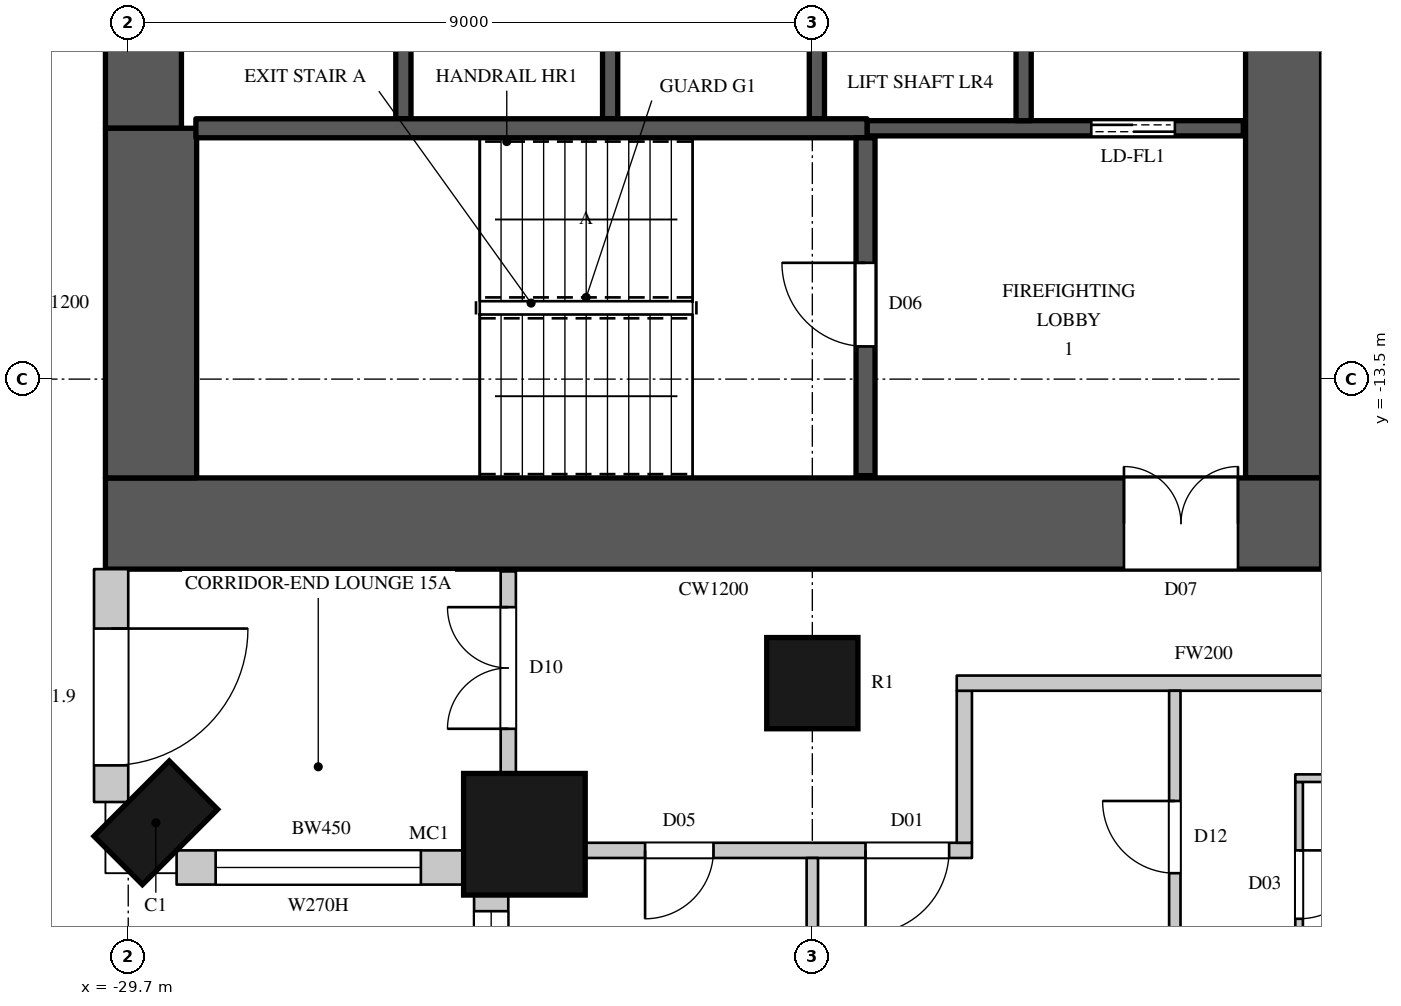
"""IFC4 building model, lengths in metres.
Left out: names, types, materials, properties, quantities, classifications, styles, units other than length and angle.
Written with IfcOpenShell. Run it as: python <this file> out.ifc"""

import sys

from ifc_helpers import new_model, si_unit, direction, frame, frame_2d, origin, origin_2d, place, context, subcontext, project, spatial, rectangle, circle, extrude, element, fill, save


model = new_model("IFC4")
c1 = context("Model", 3, precision=1e-05, world=origin(), true_north=direction((0.0, 1.0)))
c2 = subcontext(c1, "Body", "Model", "MODEL_VIEW")
j1 = project(units=[si_unit("LENGTHUNIT", "METRE"), si_unit("PLANEANGLEUNIT", "RADIAN")], contexts=[c1])
p1 = place(None, origin())
s1 = spatial("IfcSite", under=j1, at=p1, CompositionType="ELEMENT")
p2 = place(p1, origin())
s2 = spatial("IfcBuilding", under=s1, at=p2, CompositionType="ELEMENT")
p3 = place(p2, frame((0.0, 0.0, 84.3)))
s3 = spatial("IfcBuildingStorey", under=s2, at=p3, CompositionType="ELEMENT", Elevation=84.3)
p4 = place(p3, frame((-29.337, -19.337, 0.0), z_axis=(0.0, 0.0, 1.0), x_axis=(0.707106781187, -0.707106781187, 0.0)))
e1 = element("IfcColumn", 1, at=p4, inside=s3, PredefinedType="COLUMN", context=c2, shape_type="SweptSolid", body=[
    extrude(rectangle(XDim=0.9, YDim=1.4, at=origin_2d()), origin(), (0.0, 0.0, 1.0), 3.6),
])
p5 = place(p3, frame((-24.488, -19.488, 0.0), z_axis=(0.0, 0.0, 1.0), x_axis=(1.0, 0.0, 0.0)))
e2 = element("IfcColumn", 2, at=p5, inside=s3, PredefinedType="COLUMN", context=c2, shape_type="SweptSolid", body=[
    extrude(circle(Radius=0.8, at=origin_2d()), origin(), (0.0, 0.0, 1.0), 3.6),
])
p6 = place(p3, frame((-20.7, -17.5, 0.0), z_axis=(0.0, 0.0, 1.0), x_axis=(1.0, 0.0, 0.0)))
e3 = element("IfcColumn", 3, at=p6, inside=s3, PredefinedType="COLUMN", context=c2, shape_type="SweptSolid", body=[
    extrude(circle(Radius=0.6, at=origin_2d()), origin(), (0.0, 0.0, 1.0), 3.6),
])
p7 = place(p3, frame((-29.925, -16.0, 0.0), z_axis=(0.0, 0.0, 1.0), x_axis=(0.0, -1.0, 0.0)))
e4 = element("IfcWall", 4, at=p7, inside=s3, PredefinedType="SOLIDWALL", context=c2, shape_type="SweptSolid", body=[
    extrude(rectangle(XDim=3.064, YDim=0.45, at=frame_2d((1.532, 0.0))), origin(), (0.0, 0.0, 1.0), 3.3),
])
p8 = place(p7, frame((0.782, 0.0, 0.0)))
e5 = element("IfcOpeningElement", 5, at=p8, cuts=e4, PredefinedType="OPENING", context=c2, shape_type="SweptSolid", body=[
    extrude(rectangle(XDim=1.8, YDim=2.4, at=frame_2d((0.9, 1.2))), frame((0.0, 0.235, 0.0), z_axis=(0.0, -1.0, 0.0), x_axis=(1.0, 0.0, 0.0)), (0.0, 0.0, 1.0), 0.47),
])
p9 = place(p3, frame((-29.064, -19.925, 0.0), z_axis=(0.0, 0.0, 1.0), x_axis=(1.0, 0.0, 0.0)))
e6 = element("IfcWall", 6, at=p9, inside=s3, PredefinedType="SOLIDWALL", context=c2, shape_type="SweptSolid", body=[
    extrude(rectangle(XDim=3.805, YDim=0.45, at=frame_2d((1.903, 0.0))), origin(), (0.0, 0.0, 1.0), 3.3),
])
p10 = place(p9, frame((0.514, 0.0, 1.05)))
e7 = element("IfcOpeningElement", 7, at=p10, cuts=e6, PredefinedType="OPENING", context=c2, shape_type="SweptSolid", body=[
    extrude(rectangle(XDim=2.7, YDim=2.0, at=frame_2d((1.35, 1.0))), frame((0.0, 0.235, 0.0), z_axis=(0.0, -1.0, 0.0), x_axis=(1.0, 0.0, 0.0)), (0.0, 0.0, 1.0), 0.47),
])
p11 = place(p3, frame((-24.925, -20.259, 0.0), z_axis=(0.0, 0.0, 1.0), x_axis=(0.0, -1.0, 0.0)))
e8 = element("IfcWall", 8, at=p11, inside=s3, PredefinedType="SOLIDWALL", context=c2, shape_type="SweptSolid", body=[
    extrude(rectangle(XDim=1.792, YDim=0.45, at=frame_2d((0.896, 0.0))), origin(), (0.0, 0.0, 1.0), 3.3),
])
p12 = place(p11, frame((0.241, 0.0, 1.05)))
e9 = element("IfcOpeningElement", 9, at=p12, cuts=e8, PredefinedType="OPENING", context=c2, shape_type="SweptSolid", body=[
    extrude(rectangle(XDim=1.2, YDim=2.0, at=frame_2d((0.6, 1.0))), frame((0.0, 0.235, 0.0), z_axis=(0.0, -1.0, 0.0), x_axis=(1.0, 0.0, 0.0)), (0.0, 0.0, 1.0), 0.47),
])
p13 = place(p3, frame((-30.0, -15.4, 0.0), z_axis=(0.0, 0.0, 1.0), x_axis=(1.0, 0.0, 0.0)))
e10 = element("IfcWall", 10, at=p13, inside=s3, PredefinedType="SHEAR", context=c2, shape_type="SweptSolid", body=[
    extrude(rectangle(XDim=16.0, YDim=1.2, at=frame_2d((8.0, 0.0))), origin(), (0.0, 0.0, 1.0), 3.6),
])
p14 = place(p13, frame((13.4, 0.0, 0.0)))
e11 = element("IfcOpeningElement", 11, at=p14, cuts=e10, PredefinedType="OPENING", context=c2, shape_type="SweptSolid", body=[
    extrude(rectangle(XDim=1.5, YDim=2.4, at=frame_2d((0.75, 1.2))), frame((0.0, 0.61, 0.0), z_axis=(0.0, -1.0, 0.0), x_axis=(1.0, 0.0, 0.0)), (0.0, 0.0, 1.0), 1.22),
])
p15 = place(p3, frame((-14.5, -14.8, 0.0), z_axis=(0.0, 0.0, 1.0), x_axis=(0.0, 1.0, 0.0)))
e12 = element("IfcWall", 12, at=p15, inside=s3, PredefinedType="SHEAR", context=c2, shape_type="SweptSolid", body=[
    extrude(rectangle(XDim=29.6, YDim=1.0, at=frame_2d((14.8, 0.0))), origin(), (0.0, 0.0, 1.0), 3.6),
])
p16 = place(p15, frame((8.45, 0.0, 0.0)))
e13 = element("IfcOpeningElement", 13, at=p16, cuts=e12, PredefinedType="OPENING", context=c2, shape_type="SweptSolid", body=[
    extrude(rectangle(XDim=1.5, YDim=2.4, at=frame_2d((0.75, 1.2))), frame((0.0, 0.51, 0.0), z_axis=(0.0, -1.0, 0.0), x_axis=(1.0, 0.0, 0.0)), (0.0, 0.0, 1.0), 1.02),
])
p17 = place(p15, frame((19.65, 0.0, 0.0)))
e14 = element("IfcOpeningElement", 14, at=p17, cuts=e12, PredefinedType="OPENING", context=c2, shape_type="SweptSolid", body=[
    extrude(rectangle(XDim=1.5, YDim=2.4, at=frame_2d((0.75, 1.2))), frame((0.0, 0.51, 0.0), z_axis=(0.0, -1.0, 0.0), x_axis=(1.0, 0.0, 0.0)), (0.0, 0.0, 1.0), 1.02),
])
p18 = place(p15, frame((14.5, 0.0, 0.0)))
e15 = element("IfcOpeningElement", 15, at=p18, cuts=e12, PredefinedType="OPENING", context=c2, shape_type="SweptSolid", body=[
    extrude(rectangle(XDim=0.6, YDim=2.0, at=frame_2d((0.3, 1.0))), frame((0.0, 0.51, 0.0), z_axis=(0.0, -1.0, 0.0), x_axis=(1.0, 0.0, 0.0)), (0.0, 0.0, 1.0), 1.02),
])
p19 = place(p3, frame((-29.5, -10.2, 0.0), z_axis=(0.0, 0.0, 1.0), x_axis=(0.0, 1.0, 0.0)))
e16 = element("IfcWall", 16, at=p19, inside=s3, PredefinedType="SHEAR", context=c2, shape_type="SweptSolid", body=[
    extrude(rectangle(XDim=20.4, YDim=1.0, at=frame_2d((10.2, 0.0))), origin(), (0.0, 0.0, 1.0), 3.6),
])
p20 = place(p3, frame((-29.4, -14.8, 0.0), z_axis=(0.0, 0.0, 1.0), x_axis=(0.0, 1.0, 0.0)))
e17 = element("IfcWall", 17, at=p20, inside=s3, PredefinedType="SHEAR", context=c2, shape_type="SweptSolid", body=[
    extrude(rectangle(XDim=4.6, YDim=1.2, at=frame_2d((2.3, 0.0))), origin(), (0.0, 0.0, 1.0), 3.6),
])
p21 = place(p3, frame((-24.7, -18.7, 0.0), z_axis=(0.0, 0.0, 1.0), x_axis=(0.0, 1.0, 0.0)))
e18 = element("IfcWall", 18, at=p21, inside=s3, PredefinedType="PARTITIONING", context=c2, shape_type="SweptSolid", body=[
    extrude(rectangle(XDim=2.67, YDim=0.2, at=frame_2d((1.335, 0.0))), origin(), (0.0, 0.0, 1.0), 3.3),
])
p22 = place(p21, frame((0.6, 0.0, 0.0)))
e19 = element("IfcOpeningElement", 19, at=p22, cuts=e18, PredefinedType="OPENING", context=c2, shape_type="SweptSolid", body=[
    extrude(rectangle(XDim=1.6, YDim=2.4, at=frame_2d((0.8, 1.2))), frame((0.0, 0.11, 0.0), z_axis=(0.0, -1.0, 0.0), x_axis=(1.0, 0.0, 0.0)), (0.0, 0.0, 1.0), 0.22),
])
p23 = place(p3, frame((-23.7, -19.7, 0.0), z_axis=(0.0, 0.0, 1.0), x_axis=(1.0, 0.0, 0.0)))
e20 = element("IfcWall", 20, at=p23, inside=s3, PredefinedType="PARTITIONING", context=c2, shape_type="SweptSolid", body=[
    extrude(rectangle(XDim=5.1, YDim=0.2, at=frame_2d((2.55, 0.0))), origin(), (0.0, 0.0, 1.0), 3.3),
])
p24 = place(p23, frame((0.8, 0.0, 0.0)))
e21 = element("IfcOpeningElement", 21, at=p24, cuts=e20, PredefinedType="OPENING", context=c2, shape_type="SweptSolid", body=[
    extrude(rectangle(XDim=0.9, YDim=2.2, at=frame_2d((0.45, 1.1))), frame((0.0, 0.11, 0.0), z_axis=(0.0, -1.0, 0.0), x_axis=(1.0, 0.0, 0.0)), (0.0, 0.0, 1.0), 0.22),
])
p25 = place(p23, frame((3.7, 0.0, 0.0)))
e22 = element("IfcOpeningElement", 22, at=p25, cuts=e20, PredefinedType="OPENING", context=c2, shape_type="SweptSolid", body=[
    extrude(rectangle(XDim=1.1, YDim=2.4, at=frame_2d((0.55, 1.2))), frame((0.0, 0.11, 0.0), z_axis=(0.0, -1.0, 0.0), x_axis=(1.0, 0.0, 0.0)), (0.0, 0.0, 1.0), 0.22),
])
p26 = place(p3, frame((-18.7, -19.6, 0.0), z_axis=(0.0, 0.0, 1.0), x_axis=(0.0, 1.0, 0.0)))
e23 = element("IfcWall", 23, at=p26, inside=s3, PredefinedType="PARTITIONING", context=c2, shape_type="SweptSolid", body=[
    extrude(rectangle(XDim=2.0, YDim=0.2, at=frame_2d((1.0, 0.0))), origin(), (0.0, 0.0, 1.0), 3.3),
])
p27 = place(p3, frame((-18.8, -17.5, 0.0), z_axis=(0.0, 0.0, 1.0), x_axis=(1.0, 0.0, 0.0)))
e24 = element("IfcWall", 24, at=p27, inside=s3, PredefinedType="PARTITIONING", context=c2, shape_type="SweptSolid", body=[
    extrude(rectangle(XDim=6.5, YDim=0.2, at=frame_2d((3.25, 0.0))), origin(), (0.0, 0.0, 1.0), 2.75),
])
p28 = place(p3, frame((-20.7, -24.75, 0.0), z_axis=(0.0, 0.0, 1.0), x_axis=(0.0, 1.0, 0.0)))
e25 = element("IfcWall", 25, at=p28, inside=s3, PredefinedType="PARTITIONING", context=c2, shape_type="SweptSolid", body=[
    extrude(rectangle(XDim=4.95, YDim=0.15, at=frame_2d((2.475, 0.0))), origin(), (0.0, 0.0, 1.0), 2.75),
])
p29 = place(p3, frame((-15.931, -25.7, 0.0), z_axis=(0.0, 0.0, 1.0), x_axis=(0.0, 1.0, 0.0)))
e26 = element("IfcWall", 26, at=p29, inside=s3, PredefinedType="PARTITIONING", context=c2, shape_type="SweptSolid", body=[
    extrude(rectangle(XDim=8.1, YDim=0.15, at=frame_2d((4.05, 0.0))), origin(), (0.0, 0.0, 1.0), 3.3),
])
p30 = place(p29, frame((5.7, 0.0, 0.0)))
e27 = element("IfcOpeningElement", 27, at=p30, cuts=e26, PredefinedType="OPENING", context=c2, shape_type="SweptSolid", body=[
    extrude(rectangle(XDim=0.95, YDim=2.2, at=frame_2d((0.475, 1.1))), frame((0.0, 0.085, 0.0), z_axis=(0.0, -1.0, 0.0), x_axis=(1.0, 0.0, 0.0)), (0.0, 0.0, 1.0), 0.17),
])
for number, where, z_axis, x_axis in (
    (28, (-26.08, -10.075, 0.0), (0.0, 0.0, 1.0), (0.0, 1.0, 0.0)),
    (29, (-23.36, -10.075, 0.0), (0.0, 0.0, 1.0), (0.0, 1.0, 0.0)),
    (30, (-20.64, -10.075, 0.0), (0.0, 0.0, 1.0), (0.0, 1.0, 0.0)),
):
    element("IfcWall", number, at=place(p3, frame(where, z_axis=z_axis, x_axis=x_axis)), inside=s3, PredefinedType="SHEAR", context=c2, shape_type="SweptSolid", body=[
        extrude(rectangle(XDim=2.575, YDim=0.2, at=frame_2d((1.288, 0.0))), origin(), (0.0, 0.0, 1.0), 3.6),
    ])
p31 = place(p3, frame((-19.98, -10.2, 0.0), z_axis=(0.0, 0.0, 1.0), x_axis=(1.0, 0.0, 0.0)))
e31 = element("IfcWall", 31, at=p31, inside=s3, PredefinedType="SHEAR", context=c2, shape_type="SweptSolid", body=[
    extrude(rectangle(XDim=4.95, YDim=0.2, at=frame_2d((2.475, 0.0))), origin(), (0.0, 0.0, 1.0), 3.3),
])
p32 = place(p31, frame((2.95, 0.0, 0.0)))
e32 = element("IfcOpeningElement", 32, at=p32, cuts=e31, PredefinedType="OPENING", context=c2, shape_type="SweptSolid", body=[
    extrude(rectangle(XDim=1.1, YDim=2.2, at=frame_2d((0.55, 1.1))), frame((0.0, 0.11, 0.0), z_axis=(0.0, -1.0, 0.0), x_axis=(1.0, 0.0, 0.0)), (0.0, 0.0, 1.0), 0.22),
])
p33 = place(p3, frame((-17.92, -10.1, 0.0), z_axis=(0.0, 0.0, 1.0), x_axis=(0.0, 1.0, 0.0)))
e33 = element("IfcWall", 33, at=p33, inside=s3, PredefinedType="SHEAR", context=c2, shape_type="SweptSolid", body=[
    extrude(rectangle(XDim=2.6, YDim=0.2, at=frame_2d((1.3, 0.0))), origin(), (0.0, 0.0, 1.0), 3.6),
])
p34 = place(p3, frame((-28.81, -10.2, 0.0), z_axis=(0.0, 0.0, 1.0), x_axis=(1.0, 0.0, 0.0)))
e34 = element("IfcWall", 34, at=p34, inside=s3, PredefinedType="SHEAR", context=c2, shape_type="SweptSolid", body=[
    extrude(rectangle(XDim=8.83, YDim=0.25, at=frame_2d((4.415, 0.0))), origin(), (0.0, 0.0, 1.0), 3.3),
])
p35 = place(p3, frame((-20.0, -14.77, 0.0), z_axis=(0.0, 0.0, 1.0), x_axis=(0.0, 1.0, 0.0)))
e35 = element("IfcWall", 35, at=p35, inside=s3, PredefinedType="SHEAR", context=c2, shape_type="SweptSolid", body=[
    extrude(rectangle(XDim=4.445, YDim=0.25, at=frame_2d((2.223, 0.0))), origin(), (0.0, 0.0, 1.0), 3.3),
])
p36 = place(p35, frame((1.7, 0.0, 0.0)))
e36 = element("IfcOpeningElement", 36, at=p36, cuts=e35, PredefinedType="OPENING", context=c2, shape_type="SweptSolid", body=[
    extrude(rectangle(XDim=1.1, YDim=2.2, at=frame_2d((0.55, 1.1))), frame((0.0, 0.135, 0.0), z_axis=(0.0, -1.0, 0.0), x_axis=(1.0, 0.0, 0.0)), (0.0, 0.0, 1.0), 0.27),
])
p37 = place(p3, frame((-14.296, -21.5, 0.0), z_axis=(0.0, 0.0, 1.0), x_axis=(0.0, 1.0, 0.0)))
e37 = element("IfcWall", 37, at=p37, inside=s3, PredefinedType="PARTITIONING", context=c2, shape_type="SweptSolid", body=[
    extrude(rectangle(XDim=2.7, YDim=0.1, at=frame_2d((1.35, 0.0))), origin(), (0.0, 0.0, 1.0), 3.3),
])
p38 = place(p37, frame((0.9, 0.0, 0.0)))
e38 = element("IfcOpeningElement", 38, at=p38, cuts=e37, PredefinedType="OPENING", context=c2, shape_type="SweptSolid", body=[
    extrude(rectangle(XDim=0.9, YDim=2.2, at=frame_2d((0.45, 1.1))), frame((0.0, 0.06, 0.0), z_axis=(0.0, -1.0, 0.0), x_axis=(1.0, 0.0, 0.0)), (0.0, 0.0, 1.0), 0.12),
])
p39 = place(p3, frame((-14.346, -18.75, 0.0), z_axis=(0.0, 0.0, 1.0), x_axis=(1.0, 0.0, 0.0)))
e39 = element("IfcWall", 39, at=p39, inside=s3, PredefinedType="PARTITIONING", context=c2, shape_type="SweptSolid", body=[
    extrude(rectangle(XDim=5.092, YDim=0.1, at=frame_2d((2.546, 0.0))), origin(), (0.0, 0.0, 1.0), 3.3),
])
p40 = place(p39, frame((3.95, 0.0, 0.0)))
e40 = element("IfcOpeningElement", 40, at=p40, cuts=e39, PredefinedType="OPENING", context=c2, shape_type="SweptSolid", body=[
    extrude(rectangle(XDim=0.9, YDim=2.2, at=frame_2d((0.45, 1.1))), frame((0.0, 0.06, 0.0), z_axis=(0.0, -1.0, 0.0), x_axis=(1.0, 0.0, 0.0)), (0.0, 0.0, 1.0), 0.12),
])
p41 = place(p8, origin())
e41 = element("IfcDoor", 41, at=p41, inside=s3, OperationType="SLIDING_TO_LEFT", PredefinedType="DOOR", context=c2, shape_type="SweptSolid", body=[
    extrude(rectangle(XDim=1.8, YDim=2.4, at=frame_2d((0.9, 1.2))), frame((0.0, 0.13, 0.0), z_axis=(0.0, -1.0, 0.0), x_axis=(1.0, 0.0, 0.0)), (0.0, 0.0, 1.0), 0.05),
])
fill(e5, e41)
p42 = place(p10, origin())
e42 = element("IfcWindow", 42, at=p42, inside=s3, PartitioningType="SINGLE_PANEL", PredefinedType="WINDOW", context=c2, shape_type="SweptSolid", body=[
    extrude(rectangle(XDim=2.7, YDim=2.0, at=frame_2d((1.35, 1.0))), frame((0.0, 0.135, 0.0), z_axis=(0.0, -1.0, 0.0), x_axis=(1.0, 0.0, 0.0)), (0.0, 0.0, 1.0), 0.06),
])
fill(e7, e42)
p43 = place(p12, origin())
e43 = element("IfcWindow", 43, at=p43, inside=s3, PartitioningType="SINGLE_PANEL", PredefinedType="WINDOW", context=c2, shape_type="SweptSolid", body=[
    extrude(rectangle(XDim=1.2, YDim=2.0, at=frame_2d((0.6, 1.0))), frame((0.0, 0.135, 0.0), z_axis=(0.0, -1.0, 0.0), x_axis=(1.0, 0.0, 0.0)), (0.0, 0.0, 1.0), 0.06),
])
fill(e9, e43)
p44 = place(p36, origin())
e44 = element("IfcDoor", 44, at=p44, inside=s3, OperationType="SINGLE_SWING_RIGHT", PredefinedType="DOOR", context=c2, shape_type="SweptSolid", body=[
    extrude(rectangle(XDim=1.1, YDim=2.2, at=frame_2d((0.55, 1.1))), frame((0.0, 0.025, 0.0), z_axis=(0.0, -1.0, 0.0), x_axis=(1.0, 0.0, 0.0)), (0.0, 0.0, 1.0), 0.05),
])
fill(e36, e44)
p45 = place(p32, origin())
e45 = element("IfcDoor", 45, at=p45, inside=s3, OperationType="DOUBLE_DOOR_SLIDING", PredefinedType="DOOR", context=c2, shape_type="SweptSolid", body=[
    extrude(rectangle(XDim=1.1, YDim=2.2, at=frame_2d((0.55, 1.1))), frame((0.0, 0.025, 0.0), z_axis=(0.0, -1.0, 0.0), x_axis=(1.0, 0.0, 0.0)), (0.0, 0.0, 1.0), 0.05),
])
fill(e32, e45)
p46 = place(p24, origin())
e46 = element("IfcDoor", 46, at=p46, inside=s3, OperationType="SINGLE_SWING_RIGHT", PredefinedType="DOOR", context=c2, shape_type="SweptSolid", body=[
    extrude(rectangle(XDim=0.9, YDim=2.2, at=frame_2d((0.45, 1.1))), frame((0.0, 0.025, 0.0), z_axis=(0.0, -1.0, 0.0), x_axis=(1.0, 0.0, 0.0)), (0.0, 0.0, 1.0), 0.05),
])
fill(e21, e46)
p47 = place(p22, origin())
e47 = element("IfcDoor", 47, at=p47, inside=s3, OperationType="DOUBLE_DOOR_SINGLE_SWING", PredefinedType="DOOR", context=c2, shape_type="SweptSolid", body=[
    extrude(rectangle(XDim=1.6, YDim=2.4, at=frame_2d((0.8, 1.2))), frame((0.0, 0.025, 0.0), z_axis=(0.0, -1.0, 0.0), x_axis=(1.0, 0.0, 0.0)), (0.0, 0.0, 1.0), 0.05),
])
fill(e19, e47)
p48 = place(p25, origin())
e48 = element("IfcDoor", 48, at=p48, inside=s3, OperationType="SINGLE_SWING_RIGHT", PredefinedType="DOOR", context=c2, shape_type="SweptSolid", body=[
    extrude(rectangle(XDim=1.1, YDim=2.4, at=frame_2d((0.55, 1.2))), frame((0.0, 0.025, 0.0), z_axis=(0.0, -1.0, 0.0), x_axis=(1.0, 0.0, 0.0)), (0.0, 0.0, 1.0), 0.05),
])
fill(e22, e48)
p49 = place(p30, origin())
e49 = element("IfcDoor", 49, at=p49, inside=s3, OperationType="SINGLE_SWING_RIGHT", PredefinedType="DOOR", context=c2, shape_type="SweptSolid", body=[
    extrude(rectangle(XDim=0.95, YDim=2.2, at=frame_2d((0.475, 1.1))), frame((0.0, 0.025, 0.0), z_axis=(0.0, -1.0, 0.0), x_axis=(1.0, 0.0, 0.0)), (0.0, 0.0, 1.0), 0.05),
])
fill(e27, e49)
p50 = place(p38, origin())
e50 = element("IfcDoor", 50, at=p50, inside=s3, OperationType="SINGLE_SWING_LEFT", PredefinedType="DOOR", context=c2, shape_type="SweptSolid", body=[
    extrude(rectangle(XDim=0.9, YDim=2.2, at=frame_2d((0.45, 1.1))), frame((0.0, 0.025, 0.0), z_axis=(0.0, -1.0, 0.0), x_axis=(1.0, 0.0, 0.0)), (0.0, 0.0, 1.0), 0.05),
])
fill(e38, e50)
p51 = place(p14, origin())
e51 = element("IfcDoor", 51, at=p51, inside=s3, OperationType="DOUBLE_DOOR_SINGLE_SWING", PredefinedType="DOOR", context=c2, shape_type="SweptSolid", body=[
    extrude(rectangle(XDim=1.5, YDim=2.4, at=frame_2d((0.75, 1.2))), frame((0.0, 0.025, 0.0), z_axis=(0.0, -1.0, 0.0), x_axis=(1.0, 0.0, 0.0)), (0.0, 0.0, 1.0), 0.05),
])
fill(e11, e51)
save(model, sys.argv[1])
